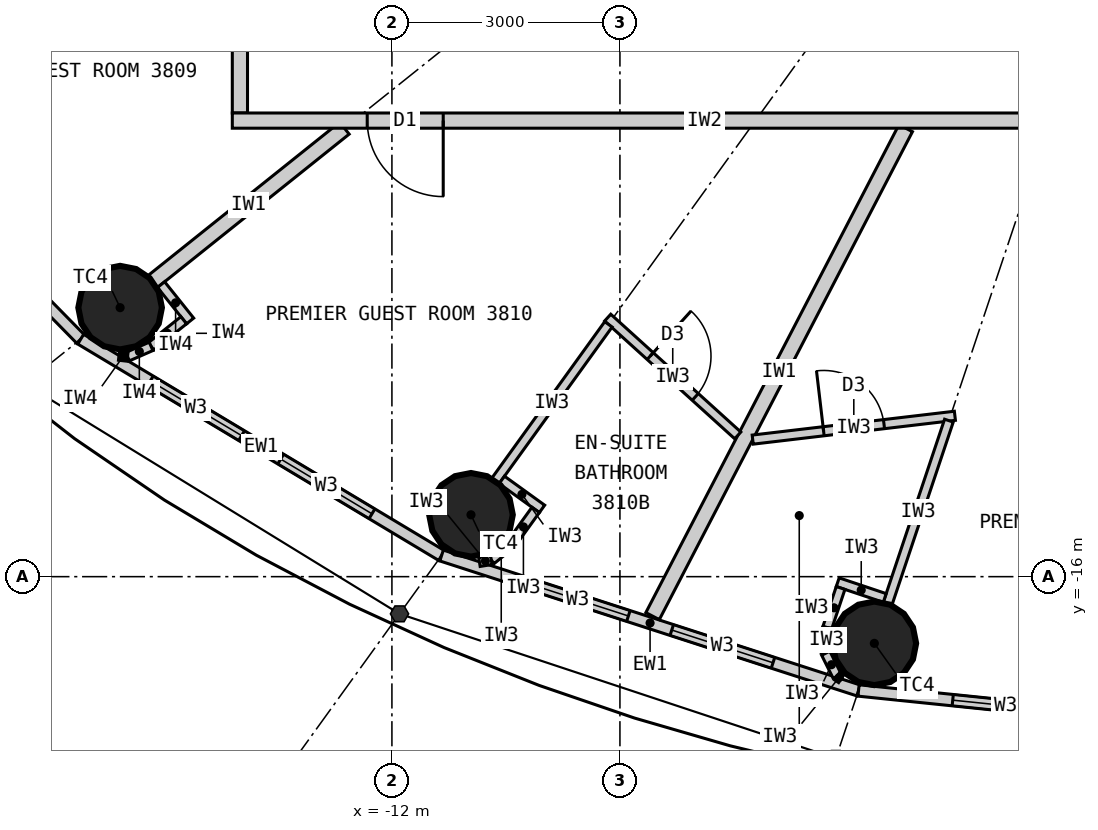
"""IFC4 building model, lengths in metres.
Left out: names, types, materials, properties, quantities, classifications, styles, units other than length and angle.
Written with IfcOpenShell. Run it as: python <this file> out.ifc"""

import sys

from ifc_helpers import new_model, si_unit, direction, frame, frame_2d, origin, origin_2d, place, context, subcontext, project, spatial, rectangle, circle, extrude, element, fill, save


model = new_model("IFC4")
c1 = context("Model", 3, precision=1e-05, world=origin(), true_north=direction((0.0, 1.0)))
c2 = subcontext(c1, "Body", "Model", "MODEL_VIEW")
j1 = project(units=[si_unit("LENGTHUNIT", "METRE"), si_unit("PLANEANGLEUNIT", "RADIAN")], contexts=[c1])
p1 = place(None, origin())
s1 = spatial("IfcSite", under=j1, at=p1, CompositionType="ELEMENT")
p2 = place(p1, origin())
s2 = spatial("IfcBuilding", under=s1, at=p2, CompositionType="ELEMENT")
p3 = place(p2, frame((0.0, 0.0, 146.7)))
s3 = spatial("IfcBuildingStorey", under=s2, at=p3, CompositionType="ELEMENT", Elevation=146.7)
for number, where, z_axis, x_axis in (
    (1, (-15.576, -12.461, 0.0), (0.0, 0.0, 1.0), (1.0, 0.0, 0.0)),
    (2, (-10.96, -15.186, 0.0), (0.0, 0.0, 1.0), (1.0, 0.0, 0.0)),
    (3, (-5.653, -16.877, 0.0), (0.0, 0.0, 1.0), (1.0, 0.0, 0.0)),
):
    element("IfcColumn", number, at=place(p3, frame(where, z_axis=z_axis, x_axis=x_axis)), inside=s3, PredefinedType="COLUMN", context=c2, shape_type="SweptSolid", body=[
        extrude(circle(Radius=0.55, at=origin_2d()), origin(), (0.0, 0.0, 1.0), 3.3),
    ])
p4 = place(p3, frame((-19.772, -9.132, 0.0), z_axis=(0.0, 0.0, 1.0), x_axis=(0.700727467776, -0.71342905457, 0.0)))
e4 = element("IfcWall", 4, at=p4, inside=s3, PredefinedType="ELEMENTEDWALL", context=c2, shape_type="SweptSolid", body=[
    extrude(rectangle(XDim=5.247, YDim=0.15, at=frame_2d((2.624, 0.0))), origin(), (0.0, 0.0, 1.0), 3.12),
])
p5 = place(p4, frame((0.924, 0.0, 0.9)))
e5 = element("IfcOpeningElement", 5, at=p5, cuts=e4, PredefinedType="OPENING", context=c2, shape_type="SweptSolid", body=[
    extrude(rectangle(XDim=1.4, YDim=1.9, at=frame_2d((0.7, 0.95))), frame((0.0, 0.085, 0.0), z_axis=(0.0, -1.0, 0.0), x_axis=(1.0, 0.0, 0.0)), (0.0, 0.0, 1.0), 0.17),
])
p6 = place(p4, frame((2.924, 0.0, 0.9)))
e6 = element("IfcOpeningElement", 6, at=p6, cuts=e4, PredefinedType="OPENING", context=c2, shape_type="SweptSolid", body=[
    extrude(rectangle(XDim=1.4, YDim=1.9, at=frame_2d((0.7, 0.95))), frame((0.0, 0.085, 0.0), z_axis=(0.0, -1.0, 0.0), x_axis=(1.0, 0.0, 0.0)), (0.0, 0.0, 1.0), 0.17),
])
p7 = place(p3, frame((-16.095, -12.876, 0.0), z_axis=(0.0, 0.0, 1.0), x_axis=(0.857695199231, -0.514158482587, 0.0)))
e7 = element("IfcWall", 7, at=p7, inside=s3, PredefinedType="ELEMENTEDWALL", context=c2, shape_type="SweptSolid", body=[
    extrude(rectangle(XDim=5.536, YDim=0.15, at=frame_2d((2.768, 0.0))), origin(), (0.0, 0.0, 1.0), 3.12),
])
p8 = place(p7, frame((1.068, 0.0, 0.9)))
e8 = element("IfcOpeningElement", 8, at=p8, cuts=e7, PredefinedType="OPENING", context=c2, shape_type="SweptSolid", body=[
    extrude(rectangle(XDim=1.4, YDim=1.9, at=frame_2d((0.7, 0.95))), frame((0.0, 0.085, 0.0), z_axis=(0.0, -1.0, 0.0), x_axis=(1.0, 0.0, 0.0)), (0.0, 0.0, 1.0), 0.17),
])
p9 = place(p7, frame((3.068, 0.0, 0.9)))
e9 = element("IfcOpeningElement", 9, at=p9, cuts=e7, PredefinedType="OPENING", context=c2, shape_type="SweptSolid", body=[
    extrude(rectangle(XDim=1.4, YDim=1.9, at=frame_2d((0.7, 0.95))), frame((0.0, 0.085, 0.0), z_axis=(0.0, -1.0, 0.0), x_axis=(1.0, 0.0, 0.0)), (0.0, 0.0, 1.0), 0.17),
])
p10 = place(p3, frame((-11.346, -15.722, 0.0), z_axis=(0.0, 0.0, 1.0), x_axis=(0.951432482129, -0.307857486429, 0.0)))
e10 = element("IfcWall", 10, at=p10, inside=s3, PredefinedType="ELEMENTEDWALL", context=c2, shape_type="SweptSolid", body=[
    extrude(rectangle(XDim=5.766, YDim=0.15, at=frame_2d((2.883, 0.0))), origin(), (0.0, 0.0, 1.0), 3.12),
])
p11 = place(p10, frame((1.183, 0.0, 0.9)))
e11 = element("IfcOpeningElement", 11, at=p11, cuts=e10, PredefinedType="OPENING", context=c2, shape_type="SweptSolid", body=[
    extrude(rectangle(XDim=1.4, YDim=1.9, at=frame_2d((0.7, 0.95))), frame((0.0, 0.085, 0.0), z_axis=(0.0, -1.0, 0.0), x_axis=(1.0, 0.0, 0.0)), (0.0, 0.0, 1.0), 0.17),
])
p12 = place(p10, frame((3.183, 0.0, 0.9)))
e12 = element("IfcOpeningElement", 12, at=p12, cuts=e10, PredefinedType="OPENING", context=c2, shape_type="SweptSolid", body=[
    extrude(rectangle(XDim=1.4, YDim=1.9, at=frame_2d((0.7, 0.95))), frame((0.0, 0.085, 0.0), z_axis=(0.0, -1.0, 0.0), x_axis=(1.0, 0.0, 0.0)), (0.0, 0.0, 1.0), 0.17),
])
p13 = place(p3, frame((-5.86, -17.497, 0.0), z_axis=(0.0, 0.0, 1.0), x_axis=(0.994751738032, -0.102318032045, 0.0)))
e13 = element("IfcWall", 13, at=p13, inside=s3, PredefinedType="ELEMENTEDWALL", context=c2, shape_type="SweptSolid", body=[
    extrude(rectangle(XDim=5.891, YDim=0.15, at=frame_2d((2.946, 0.0))), origin(), (0.0, 0.0, 1.0), 3.12),
])
p14 = place(p13, frame((1.246, 0.0, 0.9)))
e14 = element("IfcOpeningElement", 14, at=p14, cuts=e13, PredefinedType="OPENING", context=c2, shape_type="SweptSolid", body=[
    extrude(rectangle(XDim=1.4, YDim=1.9, at=frame_2d((0.7, 0.95))), frame((0.0, 0.085, 0.0), z_axis=(0.0, -1.0, 0.0), x_axis=(1.0, 0.0, 0.0)), (0.0, 0.0, 1.0), 0.17),
])
p15 = place(p13, frame((3.246, 0.0, 0.9)))
e15 = element("IfcOpeningElement", 15, at=p15, cuts=e13, PredefinedType="OPENING", context=c2, shape_type="SweptSolid", body=[
    extrude(rectangle(XDim=1.4, YDim=1.9, at=frame_2d((0.7, 0.95))), frame((0.0, 0.085, 0.0), z_axis=(0.0, -1.0, 0.0), x_axis=(1.0, 0.0, 0.0)), (0.0, 0.0, 1.0), 0.17),
])
p16 = place(p3, frame((-12.625, -10.1, 0.0), z_axis=(0.0, 0.0, 1.0), x_axis=(-0.780876185034, -0.624685827954, 0.0)))
e16 = element("IfcWall", 16, at=p16, inside=s3, PredefinedType="PARTITIONING", context=c2, shape_type="SweptSolid", body=[
    extrude(rectangle(XDim=3.229, YDim=0.2, at=frame_2d((1.615, 0.0))), origin(), (0.0, 0.0, 1.0), 2.42),
])
p17 = place(p3, frame((-5.24, -10.1, 0.0), z_axis=(0.0, 0.0, 1.0), x_axis=(-0.460532965373, -0.887642601391, 0.0)))
e17 = element("IfcWall", 17, at=p17, inside=s3, PredefinedType="PARTITIONING", context=c2, shape_type="SweptSolid", body=[
    extrude(rectangle(XDim=7.231, YDim=0.2, at=frame_2d((3.616, 0.0))), origin(), (0.0, 0.0, 1.0), 3.12),
])
p18 = place(p3, frame((-7.45, -14.142, 0.0), z_axis=(0.0, 0.0, 1.0), x_axis=(-0.74113984586, 0.671350675041, 0.0)))
e18 = element("IfcWall", 18, at=p18, inside=s3, PredefinedType="PARTITIONING", context=c2, shape_type="SweptSolid", body=[
    extrude(rectangle(XDim=2.309, YDim=0.12, at=frame_2d((1.154, 0.0))), origin(), (0.0, 0.0, 1.0), 3.12),
])
p19 = place(p18, frame((0.754, 0.0, 0.0)))
e19 = element("IfcOpeningElement", 19, at=p19, cuts=e18, PredefinedType="OPENING", context=c2, shape_type="SweptSolid", body=[
    extrude(rectangle(XDim=0.8, YDim=2.1, at=frame_2d((0.4, 1.05))), frame((0.0, 0.07, 0.0), z_axis=(0.0, -1.0, 0.0), x_axis=(1.0, 0.0, 0.0)), (0.0, 0.0, 1.0), 0.14),
])
p20 = place(p3, frame((-9.151, -12.681, 0.0), z_axis=(0.0, 0.0, 1.0), x_axis=(-0.585258912334, -0.8108464747, 0.0)))
e20 = element("IfcWall", 20, at=p20, inside=s3, PredefinedType="PARTITIONING", context=c2, shape_type="SweptSolid", body=[
    extrude(rectangle(XDim=2.54, YDim=0.12, at=frame_2d((1.27, 0.0))), origin(), (0.0, 0.0, 1.0), 2.42),
])
p21 = place(p3, frame((-10.554, -14.727, 0.0), z_axis=(0.0, 0.0, 1.0), x_axis=(0.811044231224, -0.584984833135, 0.0)))
e21 = element("IfcWall", 21, at=p21, inside=s3, PredefinedType="PARTITIONING", context=c2, shape_type="SweptSolid", body=[
    extrude(rectangle(XDim=0.652, YDim=0.12, at=frame_2d((0.326, 0.0))), origin(), (0.0, 0.0, 1.0), 3.12),
])
p22 = place(p3, frame((-10.109, -15.122, 0.0), z_axis=(0.0, 0.0, 1.0), x_axis=(-0.585344718358, -0.810784534072, 0.0)))
e22 = element("IfcWall", 22, at=p22, inside=s3, PredefinedType="PARTITIONING", context=c2, shape_type="SweptSolid", body=[
    extrude(rectangle(XDim=0.55, YDim=0.12, at=frame_2d((0.275, 0.0))), origin(), (0.0, 0.0, 1.0), 3.12),
])
p23 = place(p3, frame((-10.431, -15.568, 0.0), z_axis=(0.0, 0.0, 1.0), x_axis=(-0.77505137267, -0.631898227345, 0.0)))
e23 = element("IfcWall", 23, at=p23, inside=s3, PredefinedType="PARTITIONING", context=c2, shape_type="SweptSolid", body=[
    extrude(rectangle(XDim=0.338, YDim=0.12, at=frame_2d((0.169, 0.0))), origin(), (0.0, 0.0, 1.0), 3.12),
])
p24 = place(p3, frame((-10.693, -15.781, 0.0), z_axis=(0.0, 0.0, 1.0), x_axis=(-0.987256785332, -0.159135287777, 0.0)))
e24 = element("IfcWall", 24, at=p24, inside=s3, PredefinedType="PARTITIONING", context=c2, shape_type="SweptSolid", body=[
    extrude(rectangle(XDim=0.158, YDim=0.12, at=frame_2d((0.079, 0.0))), origin(), (0.0, 0.0, 1.0), 3.12),
])
p25 = place(p3, frame((-7.253, -14.197, 0.0), z_axis=(0.0, 0.0, 1.0), x_axis=(0.993128188393, 0.117031625725, 0.0)))
e25 = element("IfcWall", 25, at=p25, inside=s3, PredefinedType="PARTITIONING", context=c2, shape_type="SweptSolid", body=[
    extrude(rectangle(XDim=2.678, YDim=0.12, at=frame_2d((1.339, 0.0))), origin(), (0.0, 0.0, 1.0), 3.12),
])
p26 = place(p25, frame((0.939, 0.0, 0.0)))
e26 = element("IfcOpeningElement", 26, at=p26, cuts=e25, PredefinedType="OPENING", context=c2, shape_type="SweptSolid", body=[
    extrude(rectangle(XDim=0.8, YDim=2.1, at=frame_2d((0.4, 1.05))), frame((0.0, 0.07, 0.0), z_axis=(0.0, -1.0, 0.0), x_axis=(1.0, 0.0, 0.0)), (0.0, 0.0, 1.0), 0.14),
])
p27 = place(p3, frame((-4.671, -13.948, 0.0), z_axis=(0.0, 0.0, 1.0), x_axis=(-0.317669167093, -0.948201613729, 0.0)))
e27 = element("IfcWall", 27, at=p27, inside=s3, PredefinedType="PARTITIONING", context=c2, shape_type="SweptSolid", body=[
    extrude(rectangle(XDim=2.54, YDim=0.12, at=frame_2d((1.27, 0.0))), origin(), (0.0, 0.0, 1.0), 2.42),
])
p28 = place(p3, frame((-5.516, -16.28, 0.0), z_axis=(0.0, 0.0, 1.0), x_axis=(-0.948157944392, 0.317799484717, 0.0)))
e28 = element("IfcWall", 28, at=p28, inside=s3, PredefinedType="PARTITIONING", context=c2, shape_type="SweptSolid", body=[
    extrude(rectangle(XDim=0.652, YDim=0.12, at=frame_2d((0.326, 0.0))), origin(), (0.0, 0.0, 1.0), 3.12),
])
p29 = place(p3, frame((-6.097, -16.149, 0.0), z_axis=(0.0, 0.0, 1.0), x_axis=(-0.317292604854, -0.948327687514, 0.0)))
e29 = element("IfcWall", 29, at=p29, inside=s3, PredefinedType="PARTITIONING", context=c2, shape_type="SweptSolid", body=[
    extrude(rectangle(XDim=0.55, YDim=0.12, at=frame_2d((0.275, 0.0))), origin(), (0.0, 0.0, 1.0), 3.12),
])
for number, where, z_axis, x_axis in (
    (30, (-6.271, -16.67, 0.0), (0.0, 0.0, 1.0), (-0.061, -0.998, 0.0)),
    (31, (-6.292, -17.007, 0.0), (0.0, 0.0, 1.0), (0.445, -0.895, 0.0)),
):
    element("IfcWall", number, at=place(p3, frame(where, z_axis=z_axis, x_axis=x_axis)), inside=s3, PredefinedType="PARTITIONING", context=c2, shape_type="SweptSolid", body=[
        extrude(rectangle(XDim=0.338, YDim=0.12, at=frame_2d((0.169, 0.0))), origin(), (0.0, 0.0, 1.0), 3.12),
    ])
p30 = place(p3, frame((-6.142, -17.31, 0.0), z_axis=(0.0, 0.0, 1.0), x_axis=(0.835039693181, -0.550189704386, 0.0)))
e32 = element("IfcWall", 32, at=p30, inside=s3, PredefinedType="PARTITIONING", context=c2, shape_type="SweptSolid", body=[
    extrude(rectangle(XDim=0.062, YDim=0.12, at=frame_2d((0.031, 0.0))), origin(), (0.0, 0.0, 1.0), 3.12),
])
p31 = place(p3, frame((-14.0, -1.67, 0.0), z_axis=(0.0, 0.0, 1.0), x_axis=(0.0, -1.0, 0.0)))
e33 = element("IfcWall", 33, at=p31, inside=s3, PredefinedType="PARTITIONING", context=c2, shape_type="SweptSolid", body=[
    extrude(rectangle(XDim=8.23, YDim=0.2, at=frame_2d((4.115, 0.0))), origin(), (0.0, 0.0, 1.0), 3.12),
])
p32 = place(p31, frame((5.552, 0.0, 0.0)))
e34 = element("IfcOpeningElement", 34, at=p32, cuts=e33, PredefinedType="OPENING", context=c2, shape_type="SweptSolid", body=[
    extrude(rectangle(XDim=1.0, YDim=2.2, at=frame_2d((0.5, 1.1))), frame((0.0, 0.11, 0.0), z_axis=(0.0, -1.0, 0.0), x_axis=(1.0, 0.0, 0.0)), (0.0, 0.0, 1.0), 0.22),
])
p33 = place(p3, frame((-1.67, -10.0, 0.0), z_axis=(0.0, 0.0, 1.0), x_axis=(-1.0, 0.0, 0.0)))
e35 = element("IfcWall", 35, at=p33, inside=s3, PredefinedType="PARTITIONING", context=c2, shape_type="SweptSolid", body=[
    extrude(rectangle(XDim=12.43, YDim=0.2, at=frame_2d((6.215, 0.0))), origin(), (0.0, 0.0, 1.0), 3.12),
])
p34 = place(p33, frame((9.655, 0.0, 0.0)))
e36 = element("IfcOpeningElement", 36, at=p34, cuts=e35, PredefinedType="OPENING", context=c2, shape_type="SweptSolid", body=[
    extrude(rectangle(XDim=1.0, YDim=2.2, at=frame_2d((0.5, 1.1))), frame((0.0, 0.11, 0.0), z_axis=(0.0, -1.0, 0.0), x_axis=(1.0, 0.0, 0.0)), (0.0, 0.0, 1.0), 0.22),
])
p35 = place(p3, frame((-15.037, -12.158, 0.0), z_axis=(0.0, 0.0, 1.0), x_axis=(0.624840920722, -0.78075208856, 0.0)))
e37 = element("IfcWall", 37, at=p35, inside=s3, PredefinedType="PARTITIONING", context=c2, shape_type="SweptSolid", body=[
    extrude(rectangle(XDim=0.612, YDim=0.12, at=frame_2d((0.306, 0.0))), origin(), (0.0, 0.0, 1.0), 3.12),
])
p36 = place(p3, frame((-14.739, -12.627, 0.0), z_axis=(0.0, 0.0, 1.0), x_axis=(-0.780912119987, -0.624640905527, 0.0)))
e38 = element("IfcWall", 38, at=p36, inside=s3, PredefinedType="PARTITIONING", context=c2, shape_type="SweptSolid", body=[
    extrude(rectangle(XDim=0.55, YDim=0.12, at=frame_2d((0.275, 0.0))), origin(), (0.0, 0.0, 1.0), 3.12),
])
p37 = place(p3, frame((-15.169, -12.97, 0.0), z_axis=(0.0, 0.0, 1.0), x_axis=(-0.915974725257, -0.401235968838, 0.0)))
e39 = element("IfcWall", 39, at=p37, inside=s3, PredefinedType="PARTITIONING", context=c2, shape_type="SweptSolid", body=[
    extrude(rectangle(XDim=0.338, YDim=0.12, at=frame_2d((0.169, 0.0))), origin(), (0.0, 0.0, 1.0), 3.12),
])
p38 = place(p3, frame((-15.478, -13.106, 0.0), z_axis=(0.0, 0.0, 1.0), x_axis=(-0.993778813557, 0.111371763588, 0.0)))
e40 = element("IfcWall", 40, at=p38, inside=s3, PredefinedType="PARTITIONING", context=c2, shape_type="SweptSolid", body=[
    extrude(rectangle(XDim=0.114, YDim=0.12, at=frame_2d((0.057, 0.0))), origin(), (0.0, 0.0, 1.0), 3.12),
])
p39 = place(p8, origin())
e41 = element("IfcWindow", 41, at=p39, inside=s3, PartitioningType="SINGLE_PANEL", PredefinedType="WINDOW", context=c2, shape_type="SweptSolid", body=[
    extrude(rectangle(XDim=1.4, YDim=1.9, at=frame_2d((0.7, 0.95))), frame((0.0, 0.03, 0.0), z_axis=(0.0, -1.0, 0.0), x_axis=(1.0, 0.0, 0.0)), (0.0, 0.0, 1.0), 0.06),
])
fill(e8, e41)
p40 = place(p9, origin())
e42 = element("IfcWindow", 42, at=p40, inside=s3, PartitioningType="SINGLE_PANEL", PredefinedType="WINDOW", context=c2, shape_type="SweptSolid", body=[
    extrude(rectangle(XDim=1.4, YDim=1.9, at=frame_2d((0.7, 0.95))), frame((0.0, 0.03, 0.0), z_axis=(0.0, -1.0, 0.0), x_axis=(1.0, 0.0, 0.0)), (0.0, 0.0, 1.0), 0.06),
])
fill(e9, e42)
p41 = place(p11, origin())
e43 = element("IfcWindow", 43, at=p41, inside=s3, PartitioningType="SINGLE_PANEL", PredefinedType="WINDOW", context=c2, shape_type="SweptSolid", body=[
    extrude(rectangle(XDim=1.4, YDim=1.9, at=frame_2d((0.7, 0.95))), frame((0.0, 0.03, 0.0), z_axis=(0.0, -1.0, 0.0), x_axis=(1.0, 0.0, 0.0)), (0.0, 0.0, 1.0), 0.06),
])
fill(e11, e43)
p42 = place(p12, origin())
e44 = element("IfcWindow", 44, at=p42, inside=s3, PartitioningType="SINGLE_PANEL", PredefinedType="WINDOW", context=c2, shape_type="SweptSolid", body=[
    extrude(rectangle(XDim=1.4, YDim=1.9, at=frame_2d((0.7, 0.95))), frame((0.0, 0.03, 0.0), z_axis=(0.0, -1.0, 0.0), x_axis=(1.0, 0.0, 0.0)), (0.0, 0.0, 1.0), 0.06),
])
fill(e12, e44)
p43 = place(p14, origin())
e45 = element("IfcWindow", 45, at=p43, inside=s3, PartitioningType="SINGLE_PANEL", PredefinedType="WINDOW", context=c2, shape_type="SweptSolid", body=[
    extrude(rectangle(XDim=1.4, YDim=1.9, at=frame_2d((0.7, 0.95))), frame((0.0, 0.03, 0.0), z_axis=(0.0, -1.0, 0.0), x_axis=(1.0, 0.0, 0.0)), (0.0, 0.0, 1.0), 0.06),
])
fill(e14, e45)
p44 = place(p19, origin())
e46 = element("IfcDoor", 46, at=p44, inside=s3, OperationType="SINGLE_SWING_RIGHT", PredefinedType="DOOR", context=c2, shape_type="SweptSolid", body=[
    extrude(rectangle(XDim=0.8, YDim=2.1, at=frame_2d((0.4, 1.05))), frame((0.0, 0.025, 0.0), z_axis=(0.0, -1.0, 0.0), x_axis=(1.0, 0.0, 0.0)), (0.0, 0.0, 1.0), 0.05),
])
fill(e19, e46)
p45 = place(p34, origin())
e47 = element("IfcDoor", 47, at=p45, inside=s3, OperationType="SINGLE_SWING_LEFT", PredefinedType="DOOR", context=c2, shape_type="SweptSolid", body=[
    extrude(rectangle(XDim=1.0, YDim=2.2, at=frame_2d((0.5, 1.1))), frame((0.0, 0.025, 0.0), z_axis=(0.0, -1.0, 0.0), x_axis=(1.0, 0.0, 0.0)), (0.0, 0.0, 1.0), 0.05),
])
fill(e36, e47)
p46 = place(p26, origin())
e48 = element("IfcDoor", 48, at=p46, inside=s3, OperationType="SINGLE_SWING_LEFT", PredefinedType="DOOR", context=c2, shape_type="SweptSolid", body=[
    extrude(rectangle(XDim=0.8, YDim=2.1, at=frame_2d((0.4, 1.05))), frame((0.0, 0.025, 0.0), z_axis=(0.0, -1.0, 0.0), x_axis=(1.0, 0.0, 0.0)), (0.0, 0.0, 1.0), 0.05),
])
fill(e26, e48)
save(model, sys.argv[1])
